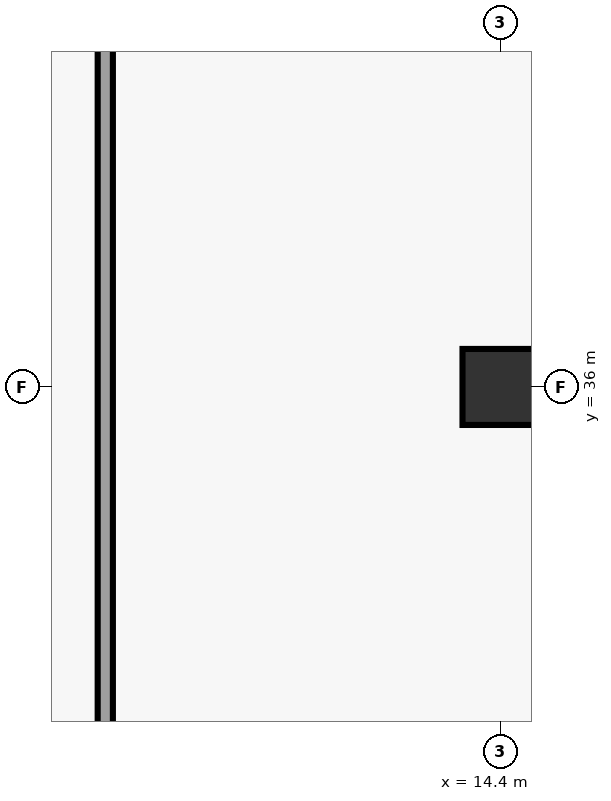
"""IFC4 building model, lengths in metres.
Left out: names, types, materials, properties, quantities, classifications, styles, units other than length and angle.
Written with IfcOpenShell. Run it as: python <this file> out.ifc"""

import sys

from ifc_helpers import new_model, si_unit, direction, frame, frame_2d, origin, origin_2d, place, context, subcontext, project, spatial, rectangle, extrude, element, save


model = new_model("IFC4")
c1 = context("Model", 3, precision=1e-05, world=origin(), true_north=direction((0.0, 1.0)))
c2 = subcontext(c1, "Body", "Model", "MODEL_VIEW")
j1 = project(units=[si_unit("LENGTHUNIT", "METRE"), si_unit("PLANEANGLEUNIT", "RADIAN")], contexts=[c1])
p1 = place(None, origin())
s1 = spatial("IfcSite", under=j1, at=p1, CompositionType="ELEMENT")
p2 = place(p1, origin())
s2 = spatial("IfcBuilding", under=s1, at=p2, CompositionType="ELEMENT")
p3 = place(p2, frame((0.0, 0.0, -5.4)))
s3 = spatial("IfcBuildingStorey", under=s2, at=p3, CompositionType="ELEMENT", Elevation=-5.4)
p4 = place(p3, frame((14.4, 36.0, 0.0), z_axis=(0.0, 0.0, 1.0), x_axis=(1.0, 0.0, 0.0)))
e1 = element("IfcColumn", 1, at=p4, inside=s3, PredefinedType="COLUMN", context=c2, shape_type="SweptSolid", body=[
    extrude(rectangle(XDim=1.0, YDim=1.0, at=origin_2d()), origin(), (0.0, 0.0, 1.0), 5.4),
])
p5 = place(p3, frame((9.2, 50.4, 0.0), z_axis=(0.0, 0.0, 1.0), x_axis=(0.0, -1.0, 0.0)))
e2 = element("IfcWall", 2, at=p5, inside=s3, PredefinedType="PARTITIONING", context=c2, shape_type="SweptSolid", body=[
    extrude(rectangle(XDim=41.2, YDim=0.2, at=frame_2d((20.6, 0.0))), origin(), (0.0, 0.0, 1.0), 4.04),
])
save(model, sys.argv[1])
